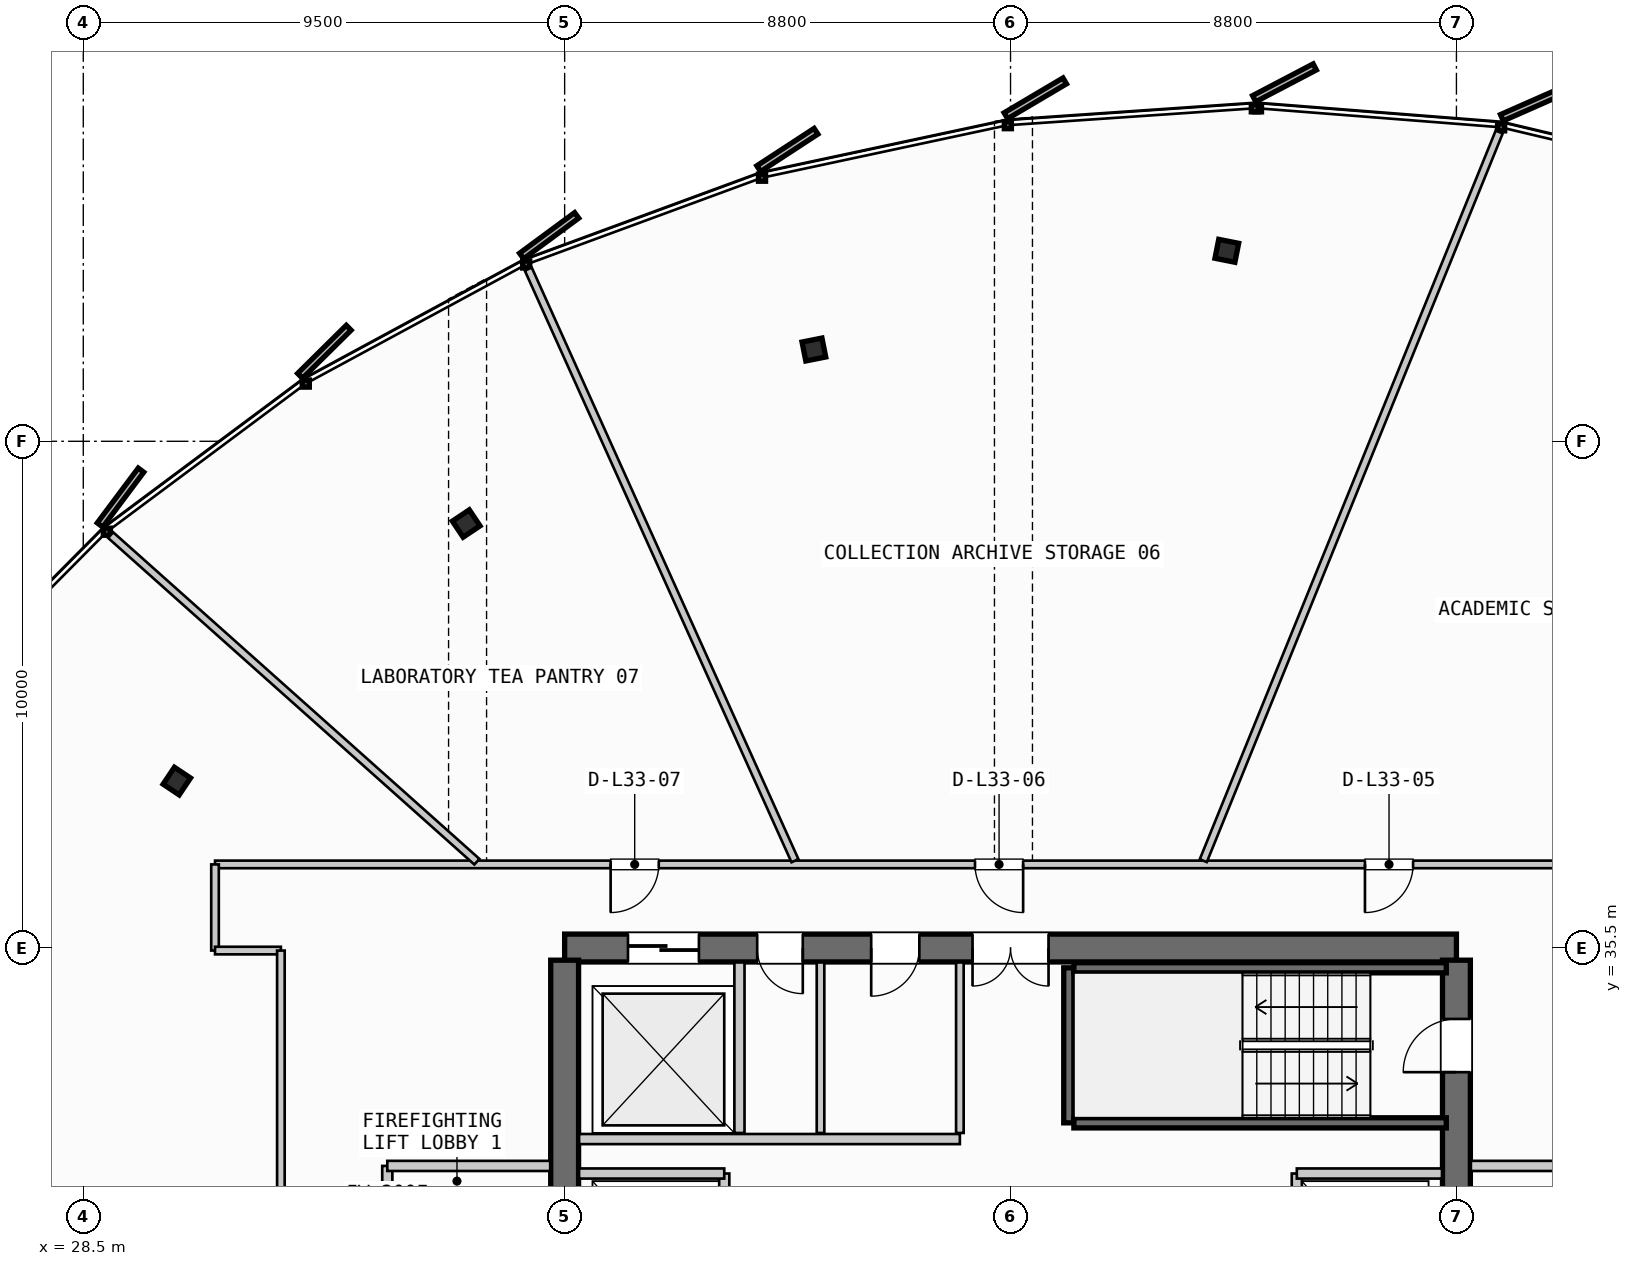
"""IFC4 building model, lengths in metres.
Left out: names, types, materials, properties, quantities, classifications, styles, units other than length and angle.
Written with IfcOpenShell. Run it as: python <this file> out.ifc"""

import sys

from ifc_helpers import new_model, si_unit, direction, frame, frame_2d, origin, origin_2d, place, context, subcontext, project, spatial, rectangle, i_section, extrude, source, transform, mapped, element, fill, save


model = new_model("IFC4")
c1 = context("Model", 3, precision=1e-05, world=origin(), true_north=direction((0.0, 1.0)))
c2 = subcontext(c1, "Body", "Model", "MODEL_VIEW")
j1 = project(units=[si_unit("LENGTHUNIT", "METRE"), si_unit("PLANEANGLEUNIT", "RADIAN")], contexts=[c1])
p1 = place(None, origin())
s1 = spatial("IfcSite", under=j1, at=p1, CompositionType="ELEMENT")
p2 = place(p1, origin())
s2 = spatial("IfcBuilding", under=s1, at=p2, CompositionType="ELEMENT")
p3 = place(p2, frame((0.0, 0.0, 132.35)))
s3 = spatial("IfcBuildingStorey", under=s2, at=p3, CompositionType="ELEMENT", Elevation=132.35)
p4 = place(p3, frame((55.6, 35.5, 0.0), z_axis=(0.0, 0.0, 1.0), x_axis=(-1.0, 0.0, 0.0)))
e1 = element("IfcWall", 1, at=p4, inside=s3, PredefinedType="SHEAR", context=c2, shape_type="SweptSolid", body=[
    extrude(rectangle(XDim=17.6, YDim=0.55, at=frame_2d((8.8, 0.0))), origin(), (0.0, 0.0, 1.0), 3.3),
])
p5 = place(p4, frame((8.05, 0.0, 0.0)))
e2 = element("IfcOpeningElement", 2, at=p5, cuts=e1, PredefinedType="OPENING", context=c2, shape_type="SweptSolid", body=[
    extrude(rectangle(XDim=1.5, YDim=2.2, at=frame_2d((0.75, 1.1))), frame((0.0, 0.285, 0.0), z_axis=(0.0, -1.0, 0.0), x_axis=(1.0, 0.0, 0.0)), (0.0, 0.0, 1.0), 0.57),
])
p6 = place(p4, frame((14.95, 0.0, 0.0)))
e3 = element("IfcOpeningElement", 3, at=p6, cuts=e1, PredefinedType="OPENING", context=c2, shape_type="SweptSolid", body=[
    extrude(rectangle(XDim=1.4, YDim=2.3, at=frame_2d((0.7, 1.15))), frame((0.0, 0.285, 0.0), z_axis=(0.0, -1.0, 0.0), x_axis=(1.0, 0.0, 0.0)), (0.0, 0.0, 1.0), 0.57),
])
p7 = place(p4, frame((12.9, 0.0, 0.0)))
e4 = element("IfcOpeningElement", 4, at=p7, cuts=e1, PredefinedType="OPENING", context=c2, shape_type="SweptSolid", body=[
    extrude(rectangle(XDim=0.9, YDim=2.15, at=frame_2d((0.45, 1.075))), frame((0.0, 0.285, 0.0), z_axis=(0.0, -1.0, 0.0), x_axis=(1.0, 0.0, 0.0)), (0.0, 0.0, 1.0), 0.57),
])
p8 = place(p4, frame((10.6, 0.0, 0.0)))
e5 = element("IfcOpeningElement", 5, at=p8, cuts=e1, PredefinedType="OPENING", context=c2, shape_type="SweptSolid", body=[
    extrude(rectangle(XDim=0.95, YDim=2.15, at=frame_2d((0.475, 1.075))), frame((0.0, 0.285, 0.0), z_axis=(0.0, -1.0, 0.0), x_axis=(1.0, 0.0, 0.0)), (0.0, 0.0, 1.0), 0.57),
])
p9 = place(p3, frame((38.0, 35.26, 0.0), z_axis=(0.0, 0.0, 1.0), x_axis=(0.0, -1.0, 0.0)))
e6 = element("IfcWall", 6, at=p9, inside=s3, PredefinedType="SHEAR", context=c2, shape_type="SweptSolid", body=[
    extrude(rectangle(XDim=14.92, YDim=0.55, at=frame_2d((7.46, 0.0))), origin(), (0.0, 0.0, 1.0), 3.3),
])
p10 = place(p9, frame((5.21, 0.0, 0.0)))
e7 = element("IfcOpeningElement", 7, at=p10, cuts=e6, PredefinedType="OPENING", context=c2, shape_type="SweptSolid", body=[
    extrude(rectangle(XDim=1.1, YDim=2.2, at=frame_2d((0.55, 1.1))), frame((0.0, 0.285, 0.0), z_axis=(0.0, -1.0, 0.0), x_axis=(1.0, 0.0, 0.0)), (0.0, 0.0, 1.0), 0.57),
])
p11 = place(p3, frame((55.6, 20.34, 0.0), z_axis=(0.0, 0.0, 1.0), x_axis=(0.0, 1.0, 0.0)))
e8 = element("IfcWall", 8, at=p11, inside=s3, PredefinedType="SHEAR", context=c2, shape_type="SweptSolid", body=[
    extrude(rectangle(XDim=14.92, YDim=0.55, at=frame_2d((7.46, 0.0))), origin(), (0.0, 0.0, 1.0), 3.3),
])
p12 = place(p11, frame((12.71, 0.0, 0.0)))
e9 = element("IfcOpeningElement", 9, at=p12, cuts=e8, PredefinedType="OPENING", context=c2, shape_type="SweptSolid", body=[
    extrude(rectangle(XDim=1.05, YDim=2.15, at=frame_2d((0.525, 1.075))), frame((0.0, 0.285, 0.0), z_axis=(0.0, -1.0, 0.0), x_axis=(1.0, 0.0, 0.0)), (0.0, 0.0, 1.0), 0.57),
])
p13 = place(p11, frame((8.61, 0.0, 0.0)))
e10 = element("IfcOpeningElement", 10, at=p13, cuts=e8, PredefinedType="OPENING", context=c2, shape_type="SweptSolid", body=[
    extrude(rectangle(XDim=1.1, YDim=2.2, at=frame_2d((0.55, 1.1))), frame((0.0, 0.285, 0.0), z_axis=(0.0, -1.0, 0.0), x_axis=(1.0, 0.0, 0.0)), (0.0, 0.0, 1.0), 0.57),
])
m1 = source(origin(), c2, "Body", "SweptSolid", [
    extrude(i_section(OverallWidth=0.401, OverallDepth=0.381, WebThickness=0.032, FlangeThickness=0.051, FilletRadius=0.015, at=origin_2d()), origin(), (0.0, 0.0, 1.0), 3.3),
])
for number, where, z_axis, x_axis in (
    (11, (51.069, 49.259, 0.0), (0.0, 0.0, 1.0), (0.195, 0.981, 0.0)),
    (12, (42.919, 47.311, 0.0), (0.0, 0.0, 1.0), (-0.195, 0.981, 0.0)),
    (13, (36.058, 43.877, 0.0), (0.0, 0.0, 1.0), (-0.556, 0.831, 0.0)),
    (14, (30.346, 38.794, 0.0), (0.0, 0.0, 1.0), (-0.831, 0.556, 0.0)),
):
    element("IfcColumn", number, at=place(p3, frame(where, z_axis=z_axis, x_axis=x_axis)), inside=s3, PredefinedType="COLUMN", context=c2, shape_type="MappedRepresentation", body=[
        mapped(m1, transform((0.0, 0.0, 0.0), scale=1.0)),
    ])
p14 = place(p3, frame((47.95, 32.05, 0.0), z_axis=(0.0, 0.0, 1.0), x_axis=(0.0, 1.0, 0.0)))
e15 = element("IfcWall", 15, at=p14, inside=s3, PredefinedType="SHEAR", context=c2, shape_type="SweptSolid", body=[
    extrude(rectangle(XDim=3.06, YDim=0.2, at=frame_2d((1.53, 0.0))), origin(), (0.0, 0.0, 1.0), 3.3),
])
for number, where, z_axis, x_axis in (
    (16, (48.05, 35.11, 0.0), (0.0, 0.0, 1.0), (1.0, 0.0, 0.0)),
    (17, (55.4, 32.05, 0.0), (0.0, 0.0, 1.0), (-1.0, 0.0, 0.0)),
):
    element("IfcWall", number, at=place(p3, frame(where, z_axis=z_axis, x_axis=x_axis)), inside=s3, PredefinedType="SHEAR", context=c2, shape_type="SweptSolid", body=[
        extrude(rectangle(XDim=7.35, YDim=0.2, at=frame_2d((3.675, 0.0))), origin(), (0.0, 0.0, 1.0), 3.3),
    ])
p15 = place(p3, frame((41.15, 27.95, 0.0), z_axis=(0.0, 0.0, 1.0), x_axis=(0.0, 1.0, 0.0)))
e18 = element("IfcWall", 18, at=p15, inside=s3, PredefinedType="PARTITIONING", context=c2, shape_type="SweptSolid", body=[
    extrude(rectangle(XDim=3.1, YDim=0.2, at=frame_2d((1.55, 0.0))), origin(), (0.0, 0.0, 1.0), 2.445),
])
p16 = place(p3, frame((38.285, 31.05, 0.0), z_axis=(0.0, 0.0, 1.0), x_axis=(1.0, 0.0, 0.0)))
e19 = element("IfcWall", 19, at=p16, inside=s3, PredefinedType="PARTITIONING", context=c2, shape_type="SweptSolid", body=[
    extrude(rectangle(XDim=2.865, YDim=0.2, at=frame_2d((1.433, 0.0))), origin(), (0.0, 0.0, 1.0), 2.445),
])
p17 = place(p3, frame((34.5, 31.2, 0.0), z_axis=(0.0, 0.0, 1.0), x_axis=(0.0, -1.0, 0.0)))
e20 = element("IfcWall", 20, at=p17, inside=s3, PredefinedType="PARTITIONING", context=c2, shape_type="SweptSolid", body=[
    extrude(rectangle(XDim=4.4, YDim=0.2, at=frame_2d((2.2, 0.0))), origin(), (0.0, 0.0, 1.0), 2.445),
])
p18 = place(p17, frame((1.65, 0.0, 0.0)))
e21 = element("IfcOpeningElement", 21, at=p18, cuts=e20, PredefinedType="OPENING", context=c2, shape_type="SweptSolid", body=[
    extrude(rectangle(XDim=1.05, YDim=2.15, at=frame_2d((0.525, 1.075))), frame((0.0, 0.11, 0.0), z_axis=(0.0, -1.0, 0.0), x_axis=(1.0, 0.0, 0.0)), (0.0, 0.0, 1.0), 0.22),
])
p19 = place(p3, frame((34.5, 31.2, 0.0), z_axis=(0.0, 0.0, 1.0), x_axis=(1.0, 0.0, 0.0)))
e22 = element("IfcWall", 22, at=p19, inside=s3, PredefinedType="PARTITIONING", context=c2, shape_type="SweptSolid", body=[
    extrude(rectangle(XDim=3.215, YDim=0.2, at=frame_2d((1.607, 0.0))), origin(), (0.0, 0.0, 1.0), 2.445),
])
p20 = place(p3, frame((52.45, 27.95, 0.0), z_axis=(0.0, 0.0, 1.0), x_axis=(0.0, 1.0, 0.0)))
e23 = element("IfcWall", 23, at=p20, inside=s3, PredefinedType="PARTITIONING", context=c2, shape_type="SweptSolid", body=[
    extrude(rectangle(XDim=3.1, YDim=0.2, at=frame_2d((1.55, 0.0))), origin(), (0.0, 0.0, 1.0), 2.445),
])
p21 = place(p3, frame((52.45, 31.05, 0.0), z_axis=(0.0, 0.0, 1.0), x_axis=(1.0, 0.0, 0.0)))
e24 = element("IfcWall", 24, at=p21, inside=s3, PredefinedType="PARTITIONING", context=c2, shape_type="SweptSolid", body=[
    extrude(rectangle(XDim=2.865, YDim=0.2, at=frame_2d((1.433, 0.0))), origin(), (0.0, 0.0, 1.0), 2.445),
])
p22 = place(p3, frame((55.885, 31.2, 0.0), z_axis=(0.0, 0.0, 1.0), x_axis=(1.0, 0.0, 0.0)))
e25 = element("IfcWall", 25, at=p22, inside=s3, PredefinedType="PARTITIONING", context=c2, shape_type="SweptSolid", body=[
    extrude(rectangle(XDim=3.215, YDim=0.2, at=frame_2d((1.607, 0.0))), origin(), (0.0, 0.0, 1.0), 2.445),
])
p23 = place(p3, frame((41.45, 31.85, 0.0), z_axis=(0.0, 0.0, 1.0), x_axis=(0.0, 1.0, 0.0)))
e26 = element("IfcWall", 26, at=p23, inside=s3, PredefinedType="PARTITIONING", context=c2, shape_type="SweptSolid", body=[
    extrude(rectangle(XDim=3.365, YDim=0.2, at=frame_2d((1.683, 0.0))), origin(), (0.0, 0.0, 1.0), 2.445),
])
p24 = place(p3, frame((38.285, 31.73, 0.0), z_axis=(0.0, 0.0, 1.0), x_axis=(1.0, 0.0, 0.0)))
e27 = element("IfcWall", 27, at=p24, inside=s3, PredefinedType="PARTITIONING", context=c2, shape_type="SweptSolid", body=[
    extrude(rectangle(XDim=7.515, YDim=0.2, at=frame_2d((3.758, 0.0))), origin(), (0.0, 0.0, 1.0), 2.445),
])
p25 = place(p3, frame((45.8, 31.85, 0.0), z_axis=(0.0, 0.0, 1.0), x_axis=(0.0, 1.0, 0.0)))
e28 = element("IfcWall", 28, at=p25, inside=s3, PredefinedType="PARTITIONING", context=c2, shape_type="SweptSolid", body=[
    extrude(rectangle(XDim=3.365, YDim=0.15, at=frame_2d((1.683, 0.0))), origin(), (0.0, 0.0, 1.0), 2.445),
])
p26 = place(p3, frame((43.05, 31.85, 0.0), z_axis=(0.0, 0.0, 1.0), x_axis=(0.0, 1.0, 0.0)))
e29 = element("IfcWall", 29, at=p26, inside=s3, PredefinedType="PLUMBINGWALL", context=c2, shape_type="SweptSolid", body=[
    extrude(rectangle(XDim=3.365, YDim=0.15, at=frame_2d((1.683, 0.0))), origin(), (0.0, 0.0, 1.0), 2.445),
])
p27 = place(p3, frame((62.5, 37.15, 0.0), z_axis=(0.0, 0.0, 1.0), x_axis=(-1.0, 0.0, 0.0)))
e30 = element("IfcWall", 30, at=p27, inside=s3, PredefinedType="PARTITIONING", context=c2, shape_type="SweptSolid", body=[
    extrude(rectangle(XDim=31.4, YDim=0.15, at=frame_2d((15.7, 0.0))), origin(), (0.0, 0.0, 1.0), 2.445),
])
p28 = place(p27, frame((7.755, 0.0, 0.0)))
e31 = element("IfcOpeningElement", 31, at=p28, cuts=e30, PredefinedType="OPENING", context=c2, shape_type="SweptSolid", body=[
    extrude(rectangle(XDim=0.95, YDim=2.15, at=frame_2d((0.475, 1.075))), frame((0.0, 0.085, 0.0), z_axis=(0.0, -1.0, 0.0), x_axis=(1.0, 0.0, 0.0)), (0.0, 0.0, 1.0), 0.17),
])
p29 = place(p27, frame((15.451, 0.0, 0.0)))
e32 = element("IfcOpeningElement", 32, at=p29, cuts=e30, PredefinedType="OPENING", context=c2, shape_type="SweptSolid", body=[
    extrude(rectangle(XDim=0.95, YDim=2.15, at=frame_2d((0.475, 1.075))), frame((0.0, 0.085, 0.0), z_axis=(0.0, -1.0, 0.0), x_axis=(1.0, 0.0, 0.0)), (0.0, 0.0, 1.0), 0.17),
])
p30 = place(p27, frame((22.642, 0.0, 0.0)))
e33 = element("IfcOpeningElement", 33, at=p30, cuts=e30, PredefinedType="OPENING", context=c2, shape_type="SweptSolid", body=[
    extrude(rectangle(XDim=0.95, YDim=2.15, at=frame_2d((0.475, 1.075))), frame((0.0, 0.085, 0.0), z_axis=(0.0, -1.0, 0.0), x_axis=(1.0, 0.0, 0.0)), (0.0, 0.0, 1.0), 0.17),
])
p31 = place(p3, frame((31.1, 37.15, 0.0), z_axis=(0.0, 0.0, 1.0), x_axis=(0.0, -1.0, 0.0)))
e34 = element("IfcWall", 34, at=p31, inside=s3, PredefinedType="PARTITIONING", context=c2, shape_type="SweptSolid", body=[
    extrude(rectangle(XDim=1.7, YDim=0.15, at=frame_2d((0.85, 0.0))), origin(), (0.0, 0.0, 1.0), 2.445),
])
p32 = place(p3, frame((31.1, 35.45, 0.0), z_axis=(0.0, 0.0, 1.0), x_axis=(1.0, 0.0, 0.0)))
e35 = element("IfcWall", 35, at=p32, inside=s3, PredefinedType="PARTITIONING", context=c2, shape_type="SweptSolid", body=[
    extrude(rectangle(XDim=1.3, YDim=0.15, at=frame_2d((0.65, 0.0))), origin(), (0.0, 0.0, 1.0), 2.445),
])
p33 = place(p3, frame((32.4, 35.45, 0.0), z_axis=(0.0, 0.0, 1.0), x_axis=(0.0, -1.0, 0.0)))
e36 = element("IfcWall", 36, at=p33, inside=s3, PredefinedType="PARTITIONING", context=c2, shape_type="SweptSolid", body=[
    extrude(rectangle(XDim=15.3, YDim=0.15, at=frame_2d((7.65, 0.0))), origin(), (0.0, 0.0, 1.0), 2.445),
])
p34 = place(p33, frame((7.175, 0.0, 0.0)))
e37 = element("IfcOpeningElement", 37, at=p34, cuts=e36, PredefinedType="OPENING", context=c2, shape_type="SweptSolid", body=[
    extrude(rectangle(XDim=0.95, YDim=2.15, at=frame_2d((0.475, 1.075))), frame((0.0, 0.085, 0.0), z_axis=(0.0, -1.0, 0.0), x_axis=(1.0, 0.0, 0.0)), (0.0, 0.0, 1.0), 0.17),
])
p35 = place(p3, frame((50.604, 37.224, 0.0), z_axis=(0.0, 0.0, 1.0), x_axis=(0.376264805721, 0.926512167203, 0.0)))
e38 = element("IfcWall", 38, at=p35, inside=s3, PredefinedType="PARTITIONING", context=c2, shape_type="SweptSolid", body=[
    extrude(rectangle(XDim=15.52, YDim=0.15, at=frame_2d((7.76, 0.0))), origin(), (0.0, 0.0, 1.0), 2.445),
])
p36 = place(p3, frame((42.545, 37.223, 0.0), z_axis=(0.0, 0.0, 1.0), x_axis=(-0.410961449485, 0.911652722827, 0.0)))
e39 = element("IfcWall", 39, at=p36, inside=s3, PredefinedType="PARTITIONING", context=c2, shape_type="SweptSolid", body=[
    extrude(rectangle(XDim=12.807, YDim=0.15, at=frame_2d((6.403, 0.0))), origin(), (0.0, 0.0, 1.0), 2.445),
])
p37 = place(p3, frame((36.268, 37.203, 0.0), z_axis=(0.0, 0.0, 1.0), x_axis=(-0.746338755333, 0.665566271898, 0.0)))
e40 = element("IfcWall", 40, at=p37, inside=s3, PredefinedType="PARTITIONING", context=c2, shape_type="SweptSolid", body=[
    extrude(rectangle(XDim=9.684, YDim=0.15, at=frame_2d((4.842, 0.0))), origin(), (0.0, 0.0, 1.0), 2.445),
])
m2 = source(origin(), c2, "Body", "SweptSolid", [
    extrude(rectangle(XDim=1.05, YDim=2.15, at=frame_2d((0.525, 1.075))), frame((0.0, 0.025, 0.0), z_axis=(0.0, -1.0, 0.0), x_axis=(1.0, 0.0, 0.0)), (0.0, 0.0, 1.0), 0.05),
])
p38 = place(p12, origin())
e41 = element("IfcDoor", 41, at=p38, inside=s3, OperationType="SINGLE_SWING_LEFT", PredefinedType="DOOR", context=c2, shape_type="MappedRepresentation", body=[
    mapped(m2, transform((0.0, 0.0, 0.0), scale=1.0)),
])
fill(e9, e41)
m3 = source(origin(), c2, "Body", "SweptSolid", [
    extrude(rectangle(XDim=1.5, YDim=2.2, at=frame_2d((0.75, 1.1))), frame((0.0, 0.025, 0.0), z_axis=(0.0, -1.0, 0.0), x_axis=(1.0, 0.0, 0.0)), (0.0, 0.0, 1.0), 0.05),
])
p39 = place(p5, origin())
e42 = element("IfcDoor", 42, at=p39, inside=s3, OperationType="DOUBLE_DOOR_SINGLE_SWING", PredefinedType="DOOR", context=c2, shape_type="MappedRepresentation", body=[
    mapped(m3, transform((0.0, 0.0, 0.0), scale=1.0)),
])
fill(e2, e42)
m4 = source(origin(), c2, "Body", "SweptSolid", [
    extrude(rectangle(XDim=1.4, YDim=2.3, at=frame_2d((0.7, 1.15))), frame((0.0, 0.025, 0.0), z_axis=(0.0, -1.0, 0.0), x_axis=(1.0, 0.0, 0.0)), (0.0, 0.0, 1.0), 0.05),
])
p40 = place(p6, origin())
e43 = element("IfcDoor", 43, at=p40, inside=s3, OperationType="SLIDING_TO_RIGHT", PredefinedType="DOOR", context=c2, shape_type="MappedRepresentation", body=[
    mapped(m4, transform((0.0, 0.0, 0.0), scale=1.0)),
])
fill(e3, e43)
m5 = source(origin(), c2, "Body", "SweptSolid", [
    extrude(rectangle(XDim=0.9, YDim=2.15, at=frame_2d((0.45, 1.075))), frame((0.0, 0.025, 0.0), z_axis=(0.0, -1.0, 0.0), x_axis=(1.0, 0.0, 0.0)), (0.0, 0.0, 1.0), 0.05),
])
p41 = place(p7, origin())
e44 = element("IfcDoor", 44, at=p41, inside=s3, OperationType="SINGLE_SWING_LEFT", PredefinedType="DOOR", context=c2, shape_type="MappedRepresentation", body=[
    mapped(m5, transform((0.0, 0.0, 0.0), scale=1.0)),
])
fill(e4, e44)
m6 = source(origin(), c2, "Body", "SweptSolid", [
    extrude(rectangle(XDim=0.95, YDim=2.15, at=frame_2d((0.475, 1.075))), frame((0.0, 0.025, 0.0), z_axis=(0.0, -1.0, 0.0), x_axis=(1.0, 0.0, 0.0)), (0.0, 0.0, 1.0), 0.05),
])
p42 = place(p8, origin())
e45 = element("IfcDoor", 45, at=p42, inside=s3, OperationType="SINGLE_SWING_RIGHT", PredefinedType="DOOR", context=c2, shape_type="MappedRepresentation", body=[
    mapped(m6, transform((0.0, 0.0, 0.0), scale=1.0)),
])
fill(e5, e45)
p43 = place(p28, origin())
e46 = element("IfcDoor", 46, at=p43, inside=s3, OperationType="SINGLE_SWING_RIGHT", PredefinedType="DOOR", context=c2, shape_type="MappedRepresentation", body=[
    mapped(m6, transform((0.0, 0.0, 0.0), scale=1.0)),
])
fill(e31, e46)
p44 = place(p29, origin())
e47 = element("IfcDoor", 47, at=p44, inside=s3, OperationType="SINGLE_SWING_LEFT", PredefinedType="DOOR", context=c2, shape_type="MappedRepresentation", body=[
    mapped(m6, transform((0.0, 0.0, 0.0), scale=1.0)),
])
fill(e32, e47)
p45 = place(p30, origin())
e48 = element("IfcDoor", 48, at=p45, inside=s3, OperationType="SINGLE_SWING_RIGHT", PredefinedType="DOOR", context=c2, shape_type="MappedRepresentation", body=[
    mapped(m6, transform((0.0, 0.0, 0.0), scale=1.0)),
])
fill(e33, e48)
save(model, sys.argv[1])
